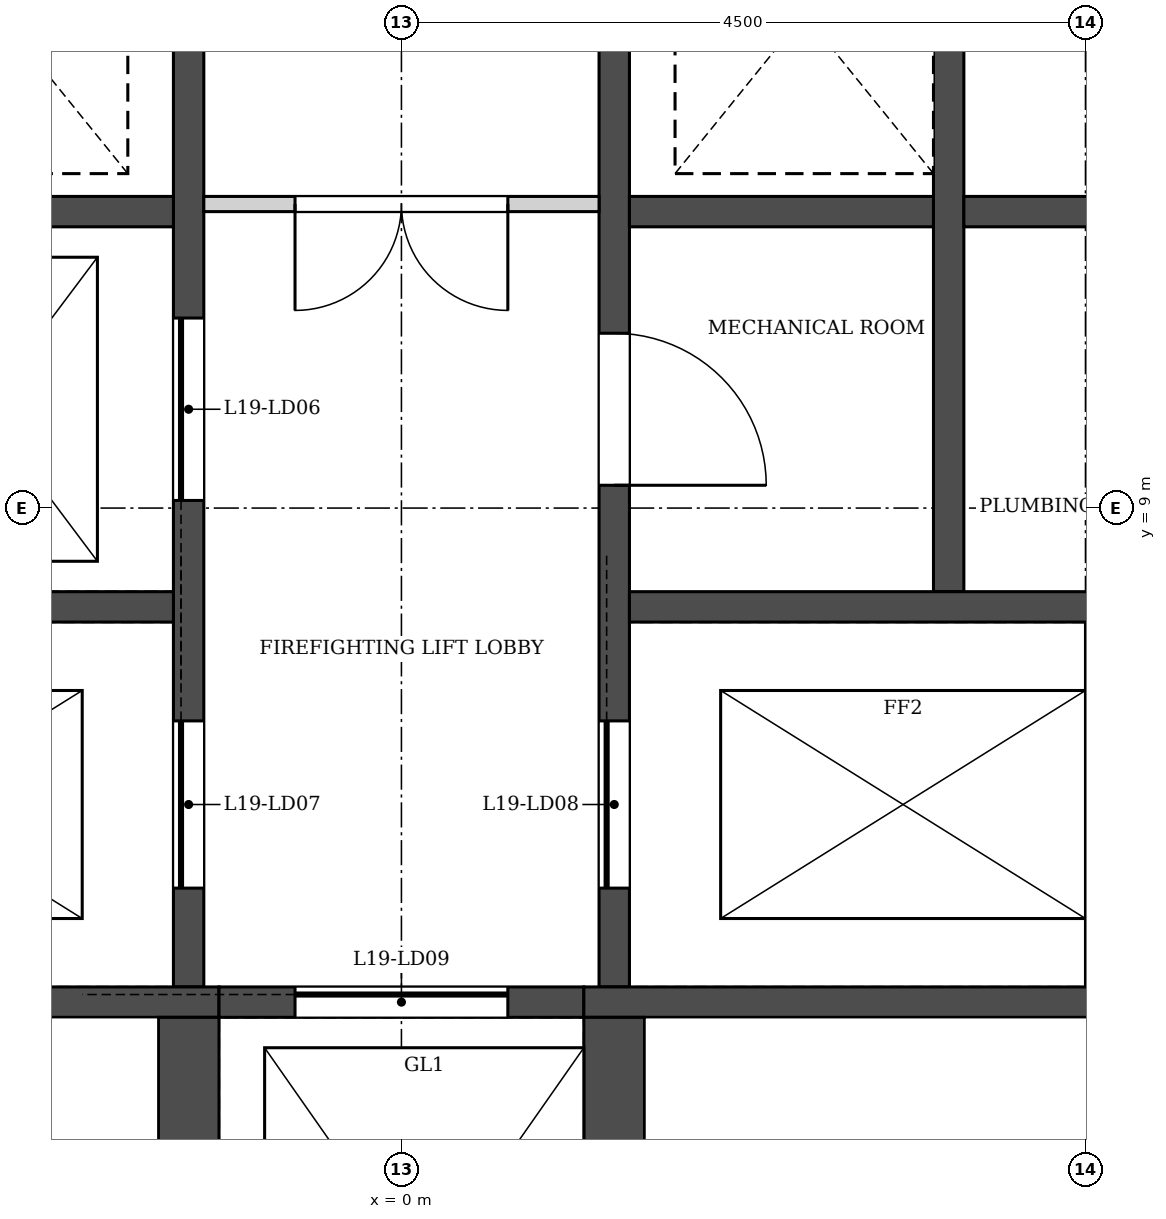
"""IFC4 building model, lengths in metres.
Left out: names, types, materials, properties, quantities, classifications, styles, units other than length and angle.
Written with IfcOpenShell. Run it as: python <this file> out.ifc"""

import sys

from ifc_helpers import new_model, si_unit, direction, frame, frame_2d, origin, place, context, subcontext, project, spatial, rectangle, extrude, element, fill, save


model = new_model("IFC4")
c1 = context("Model", 3, precision=1e-05, world=origin(), true_north=direction((0.0, 1.0)))
c2 = subcontext(c1, "Body", "Model", "MODEL_VIEW")
j1 = project(units=[si_unit("LENGTHUNIT", "METRE"), si_unit("PLANEANGLEUNIT", "RADIAN")], contexts=[c1])
p1 = place(None, origin())
s1 = spatial("IfcSite", under=j1, at=p1, CompositionType="ELEMENT")
p2 = place(p1, origin())
s2 = spatial("IfcBuilding", under=s1, at=p2, CompositionType="ELEMENT")
p3 = place(p2, frame((0.0, 0.0, 88.9)))
s3 = spatial("IfcBuildingStorey", under=s2, at=p3, CompositionType="ELEMENT", Elevation=88.9)
p4 = place(p3, frame((30.863, 7.709, 0.0), z_axis=(0.0, 0.0, 1.0), x_axis=(-0.500000400847, 0.866025172355, 0.0)))
e1 = element("IfcWall", 1, at=p4, inside=s3, PredefinedType="SOLIDWALL", context=c2, shape_type="SweptSolid", body=[
    extrude(rectangle(XDim=53.021, YDim=0.34, at=frame_2d((26.51, 0.0))), origin(), (0.0, 0.0, 1.0), 6.8),
])
p5 = place(p4, frame((30.755, 0.0, 0.9)))
e2 = element("IfcOpeningElement", 2, at=p5, cuts=e1, PredefinedType="OPENING", context=c2, shape_type="SweptSolid", body=[
    extrude(rectangle(XDim=1.885, YDim=3.0, at=frame_2d((0.942, 1.5))), frame((0.0, 0.18, 0.0), z_axis=(0.0, -1.0, 0.0), x_axis=(1.0, 0.0, 0.0)), (0.0, 0.0, 1.0), 0.36),
])
p6 = place(p4, frame((36.755, 0.0, 0.9)))
e3 = element("IfcOpeningElement", 3, at=p6, cuts=e1, PredefinedType="OPENING", context=c2, shape_type="SweptSolid", body=[
    extrude(rectangle(XDim=1.885, YDim=3.0, at=frame_2d((0.942, 1.5))), frame((0.0, 0.18, 0.0), z_axis=(0.0, -1.0, 0.0), x_axis=(1.0, 0.0, 0.0)), (0.0, 0.0, 1.0), 0.36),
])
p7 = place(p4, frame((42.755, 0.0, 0.9)))
e4 = element("IfcOpeningElement", 4, at=p7, cuts=e1, PredefinedType="OPENING", context=c2, shape_type="SweptSolid", body=[
    extrude(rectangle(XDim=1.885, YDim=3.0, at=frame_2d((0.942, 1.5))), frame((0.0, 0.18, 0.0), z_axis=(0.0, -1.0, 0.0), x_axis=(1.0, 0.0, 0.0)), (0.0, 0.0, 1.0), 0.36),
])
p8 = place(p4, frame((48.755, 0.0, 0.9)))
e5 = element("IfcOpeningElement", 5, at=p8, cuts=e1, PredefinedType="OPENING", context=c2, shape_type="SweptSolid", body=[
    extrude(rectangle(XDim=1.885, YDim=3.0, at=frame_2d((0.942, 1.5))), frame((0.0, 0.18, 0.0), z_axis=(0.0, -1.0, 0.0), x_axis=(1.0, 0.0, 0.0)), (0.0, 0.0, 1.0), 0.36),
])
p9 = place(p3, frame((3.6, 8.45, -0.3), z_axis=(0.0, 0.0, 1.0), x_axis=(0.0, 1.0, 0.0)))
e6 = element("IfcWall", 6, at=p9, inside=s3, PredefinedType="SOLIDWALL", context=c2, shape_type="SweptSolid", body=[
    extrude(rectangle(XDim=7.8, YDim=0.2, at=frame_2d((3.9, 0.0))), origin(), (0.0, 0.0, 1.0), 7.1),
])
p10 = place(p3, frame((-1.4, 5.85, -0.3), z_axis=(0.0, 0.0, 1.0), x_axis=(0.0, 1.0, 0.0)))
e7 = element("IfcWall", 7, at=p10, inside=s3, PredefinedType="SOLIDWALL", context=c2, shape_type="SweptSolid", body=[
    extrude(rectangle(XDim=11.75, YDim=0.2, at=frame_2d((5.875, 0.0))), origin(), (0.0, 0.0, 1.0), 7.1),
])
p11 = place(p10, frame((3.2, 0.0, 0.3)))
e8 = element("IfcOpeningElement", 8, at=p11, cuts=e7, PredefinedType="OPENING", context=c2, shape_type="SweptSolid", body=[
    extrude(rectangle(XDim=1.2, YDim=2.1, at=frame_2d((0.6, 1.05))), frame((0.0, 0.11, 0.0), z_axis=(0.0, -1.0, 0.0), x_axis=(1.0, 0.0, 0.0)), (0.0, 0.0, 1.0), 0.22),
])
p12 = place(p10, frame((0.65, 0.0, 0.3)))
e9 = element("IfcOpeningElement", 9, at=p12, cuts=e7, PredefinedType="OPENING", context=c2, shape_type="SweptSolid", body=[
    extrude(rectangle(XDim=1.1, YDim=2.1, at=frame_2d((0.55, 1.05))), frame((0.0, 0.11, 0.0), z_axis=(0.0, -1.0, 0.0), x_axis=(1.0, 0.0, 0.0)), (0.0, 0.0, 1.0), 0.22),
])
p13 = place(p3, frame((1.4, 5.85, -0.3), z_axis=(0.0, 0.0, 1.0), x_axis=(0.0, 1.0, 0.0)))
e10 = element("IfcWall", 10, at=p13, inside=s3, PredefinedType="SOLIDWALL", context=c2, shape_type="SweptSolid", body=[
    extrude(rectangle(XDim=11.75, YDim=0.2, at=frame_2d((5.875, 0.0))), origin(), (0.0, 0.0, 1.0), 7.1),
])
p14 = place(p13, frame((0.65, 0.0, 0.3)))
e11 = element("IfcOpeningElement", 11, at=p14, cuts=e10, PredefinedType="OPENING", context=c2, shape_type="SweptSolid", body=[
    extrude(rectangle(XDim=1.1, YDim=2.1, at=frame_2d((0.55, 1.05))), frame((0.0, 0.11, 0.0), z_axis=(0.0, -1.0, 0.0), x_axis=(1.0, 0.0, 0.0)), (0.0, 0.0, 1.0), 0.22),
])
p15 = place(p13, frame((3.3, 0.0, 0.3)))
e12 = element("IfcOpeningElement", 12, at=p15, cuts=e10, PredefinedType="OPENING", context=c2, shape_type="SweptSolid", body=[
    extrude(rectangle(XDim=1.0, YDim=2.1, at=frame_2d((0.5, 1.05))), frame((0.0, 0.11, 0.0), z_axis=(0.0, -1.0, 0.0), x_axis=(1.0, 0.0, 0.0)), (0.0, 0.0, 1.0), 0.22),
])
for number, where, z_axis, x_axis in (
    (13, (-5.7, 8.35, -0.3), (0.0, 0.0, 1.0), (1.0, 0.0, 0.0)),
    (14, (1.5, 8.35, -0.3), (0.0, 0.0, 1.0), (1.0, 0.0, 0.0)),
):
    element("IfcWall", number, at=place(p3, frame(where, z_axis=z_axis, x_axis=x_axis)), inside=s3, PredefinedType="SOLIDWALL", context=c2, shape_type="SweptSolid", body=[
        extrude(rectangle(XDim=4.2, YDim=0.2, at=frame_2d((2.1, 0.0))), origin(), (0.0, 0.0, 1.0), 7.1),
    ])
p16 = place(p3, frame((-12.6, 5.75, -0.3), z_axis=(0.0, 0.0, 1.0), x_axis=(1.0, 0.0, 0.0)))
e15 = element("IfcWall", 15, at=p16, inside=s3, PredefinedType="SOLIDWALL", context=c2, shape_type="SweptSolid", body=[
    extrude(rectangle(XDim=11.4, YDim=0.2, at=frame_2d((5.7, 0.0))), origin(), (0.0, 0.0, 1.0), 7.1),
])
p17 = place(p3, frame((-1.2, 5.75, -0.3), z_axis=(0.0, 0.0, 1.0), x_axis=(1.0, 0.0, 0.0)))
e16 = element("IfcWall", 16, at=p17, inside=s3, PredefinedType="SOLIDWALL", context=c2, shape_type="SweptSolid", body=[
    extrude(rectangle(XDim=2.4, YDim=0.2, at=frame_2d((1.2, 0.0))), origin(), (0.0, 0.0, 1.0), 7.1),
])
p18 = place(p17, frame((0.5, 0.0, 0.3)))
e17 = element("IfcOpeningElement", 17, at=p18, cuts=e16, PredefinedType="OPENING", context=c2, shape_type="SweptSolid", body=[
    extrude(rectangle(XDim=1.4, YDim=2.1, at=frame_2d((0.7, 1.05))), frame((0.0, 0.11, 0.0), z_axis=(0.0, -1.0, 0.0), x_axis=(1.0, 0.0, 0.0)), (0.0, 0.0, 1.0), 0.22),
])
p19 = place(p3, frame((1.2, 5.75, -0.3), z_axis=(0.0, 0.0, 1.0), x_axis=(1.0, 0.0, 0.0)))
e18 = element("IfcWall", 18, at=p19, inside=s3, PredefinedType="SOLIDWALL", context=c2, shape_type="SweptSolid", body=[
    extrude(rectangle(XDim=11.4, YDim=0.2, at=frame_2d((5.7, 0.0))), origin(), (0.0, 0.0, 1.0), 7.1),
])
for number, where, z_axis, x_axis in (
    (19, (-1.4, 2.25, -0.3), (0.0, 0.0, 1.0), (0.0, 1.0, 0.0)),
    (20, (1.4, 2.25, -0.3), (0.0, 0.0, 1.0), (0.0, 1.0, 0.0)),
):
    element("IfcWall", number, at=place(p3, frame(where, z_axis=z_axis, x_axis=x_axis)), inside=s3, PredefinedType="SOLIDWALL", context=c2, shape_type="SweptSolid", body=[
        extrude(rectangle(XDim=3.4, YDim=0.4, at=frame_2d((1.7, 0.0))), origin(), (0.0, 0.0, 1.0), 7.1),
    ])
for number, where, z_axis, x_axis in (
    (21, (-3.5, 10.95, -0.3), (0.0, 0.0, 1.0), (1.0, 0.0, 0.0)),
    (22, (3.7, 10.95, -0.3), (0.0, 0.0, 1.0), (1.0, 0.0, 0.0)),
    (23, (1.5, 10.95, -0.3), (0.0, 0.0, 1.0), (1.0, 0.0, 0.0)),
):
    element("IfcWall", number, at=place(p3, frame(where, z_axis=z_axis, x_axis=x_axis)), inside=s3, PredefinedType="SOLIDWALL", context=c2, shape_type="SweptSolid", body=[
        extrude(rectangle(XDim=2.0, YDim=0.2, at=frame_2d((1.0, 0.0))), origin(), (0.0, 0.0, 1.0), 7.1),
    ])
p20 = place(p3, frame((-1.3, 11.0, 0.0), z_axis=(0.0, 0.0, 1.0), x_axis=(1.0, 0.0, 0.0)))
e24 = element("IfcWall", 24, at=p20, inside=s3, PredefinedType="PARTITIONING", context=c2, shape_type="SweptSolid", body=[
    extrude(rectangle(XDim=2.6, YDim=0.1, at=frame_2d((1.3, 0.0))), origin(), (0.0, 0.0, 1.0), 6.8),
])
p21 = place(p20, frame((0.6, 0.0, 0.0)))
e25 = element("IfcOpeningElement", 25, at=p21, cuts=e24, PredefinedType="OPENING", context=c2, shape_type="SweptSolid", body=[
    extrude(rectangle(XDim=1.4, YDim=2.1, at=frame_2d((0.7, 1.05))), frame((0.0, 0.06, 0.0), z_axis=(0.0, -1.0, 0.0), x_axis=(1.0, 0.0, 0.0)), (0.0, 0.0, 1.0), 0.12),
])
p22 = place(p11, origin())
e26 = element("IfcDoor", 26, at=p22, inside=s3, OperationType="SLIDING_TO_LEFT", PredefinedType="DOOR", context=c2, shape_type="SweptSolid", body=[
    extrude(rectangle(XDim=1.2, YDim=2.1, at=frame_2d((0.6, 1.05))), frame((0.0, 0.025, 0.0), z_axis=(0.0, -1.0, 0.0), x_axis=(1.0, 0.0, 0.0)), (0.0, 0.0, 1.0), 0.05),
])
fill(e8, e26)
p23 = place(p12, origin())
e27 = element("IfcDoor", 27, at=p23, inside=s3, OperationType="SLIDING_TO_RIGHT", PredefinedType="DOOR", context=c2, shape_type="SweptSolid", body=[
    extrude(rectangle(XDim=1.1, YDim=2.1, at=frame_2d((0.55, 1.05))), frame((0.0, 0.025, 0.0), z_axis=(0.0, -1.0, 0.0), x_axis=(1.0, 0.0, 0.0)), (0.0, 0.0, 1.0), 0.05),
])
fill(e9, e27)
p24 = place(p14, origin())
e28 = element("IfcDoor", 28, at=p24, inside=s3, OperationType="SLIDING_TO_RIGHT", PredefinedType="DOOR", context=c2, shape_type="SweptSolid", body=[
    extrude(rectangle(XDim=1.1, YDim=2.1, at=frame_2d((0.55, 1.05))), frame((0.0, 0.025, 0.0), z_axis=(0.0, -1.0, 0.0), x_axis=(1.0, 0.0, 0.0)), (0.0, 0.0, 1.0), 0.05),
])
fill(e11, e28)
p25 = place(p18, origin())
e29 = element("IfcDoor", 29, at=p25, inside=s3, OperationType="SLIDING_TO_LEFT", PredefinedType="DOOR", context=c2, shape_type="SweptSolid", body=[
    extrude(rectangle(XDim=1.4, YDim=2.1, at=frame_2d((0.7, 1.05))), frame((0.0, 0.025, 0.0), z_axis=(0.0, -1.0, 0.0), x_axis=(1.0, 0.0, 0.0)), (0.0, 0.0, 1.0), 0.05),
])
fill(e17, e29)
p26 = place(p15, frame((1.0, 0.0, 0.0), z_axis=(0.0, 0.0, 1.0), x_axis=(-1.0, 0.0, 0.0)))
e30 = element("IfcDoor", 30, at=p26, inside=s3, OperationType="SINGLE_SWING_RIGHT", PredefinedType="DOOR", context=c2, shape_type="SweptSolid", body=[
    extrude(rectangle(XDim=1.0, YDim=2.1, at=frame_2d((0.5, 1.05))), frame((0.0, 0.025, 0.0), z_axis=(0.0, -1.0, 0.0), x_axis=(1.0, 0.0, 0.0)), (0.0, 0.0, 1.0), 0.05),
])
fill(e12, e30)
p27 = place(p21, frame((1.4, 0.0, 0.0), z_axis=(0.0, 0.0, 1.0), x_axis=(-1.0, 0.0, 0.0)))
e31 = element("IfcDoor", 31, at=p27, inside=s3, OperationType="DOUBLE_DOOR_SINGLE_SWING", PredefinedType="DOOR", context=c2, shape_type="SweptSolid", body=[
    extrude(rectangle(XDim=1.4, YDim=2.1, at=frame_2d((0.7, 1.05))), frame((0.0, 0.025, 0.0), z_axis=(0.0, -1.0, 0.0), x_axis=(1.0, 0.0, 0.0)), (0.0, 0.0, 1.0), 0.05),
])
fill(e25, e31)
save(model, sys.argv[1])
